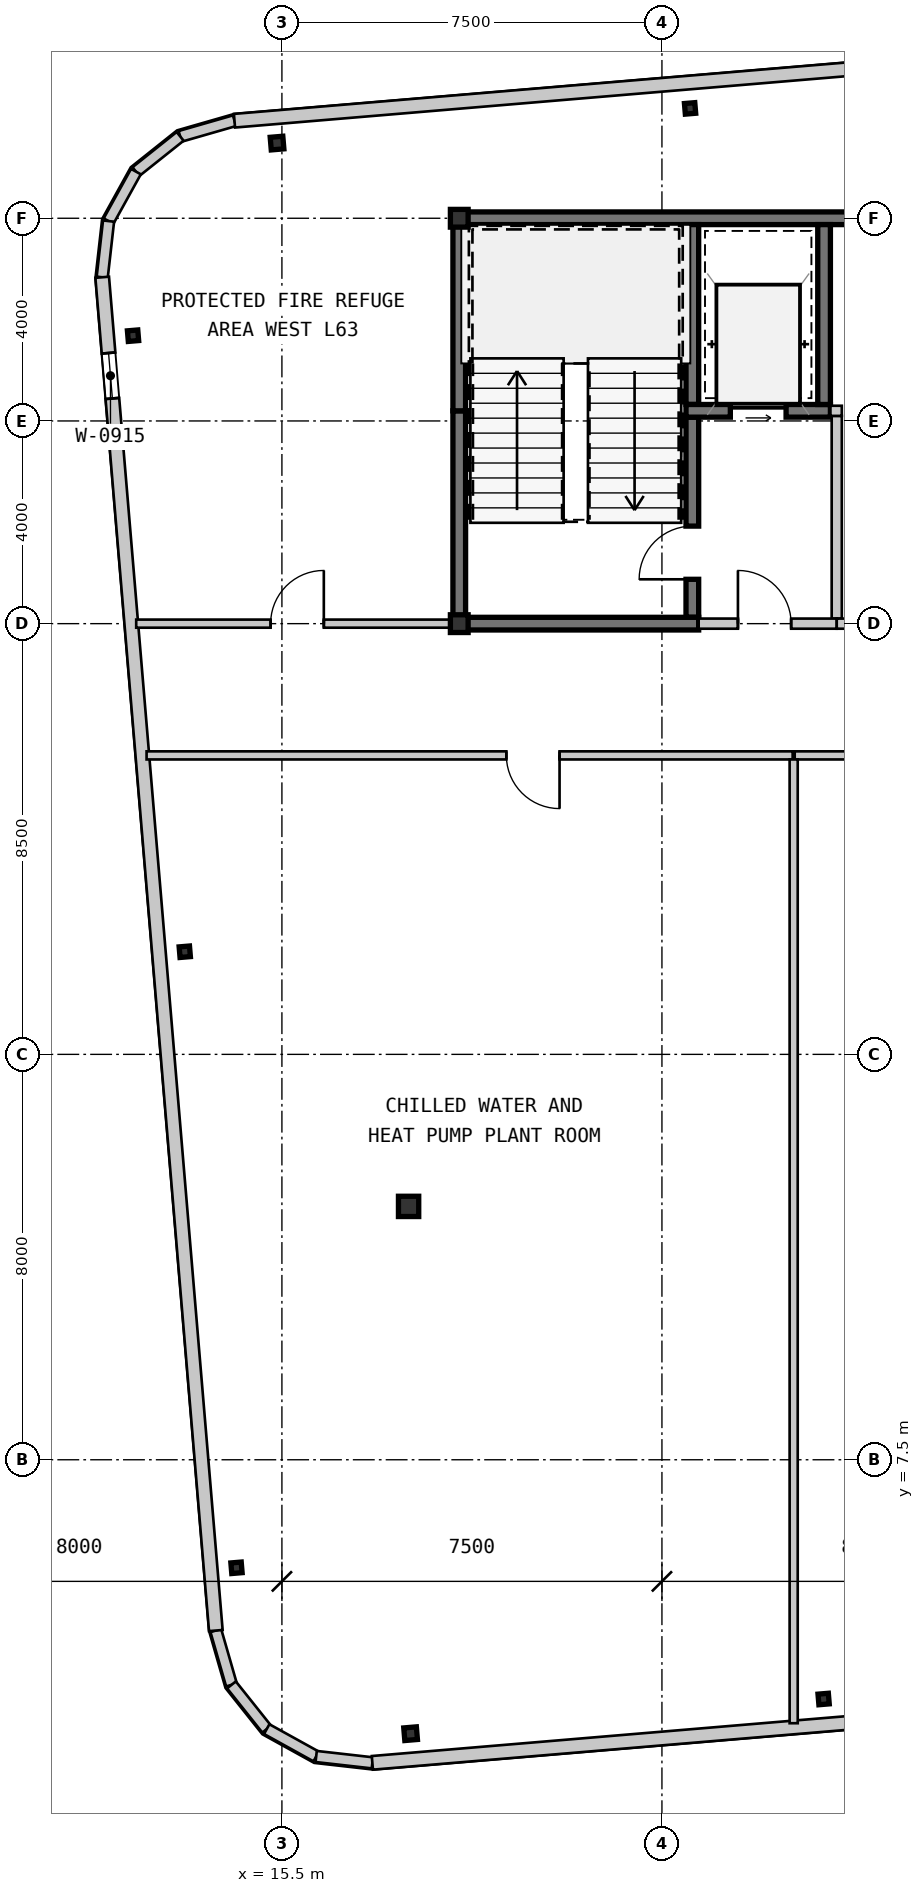
"""IFC4 building model, lengths in metres.
Left out: names, types, materials, properties, quantities, classifications, styles, units other than length and angle.
Written with IfcOpenShell. Run it as: python <this file> out.ifc"""

import sys

from ifc_helpers import new_model, si_unit, direction, frame, frame_2d, origin, origin_2d, place, context, subcontext, project, spatial, rectangle, hollow_rectangle, i_section, extrude, source, transform, mapped, element, fill, save


model = new_model("IFC4")
c1 = context("Model", 3, precision=1e-05, world=origin(), true_north=direction((0.0, 1.0)))
c2 = subcontext(c1, "Body", "Model", "MODEL_VIEW")
j1 = project(units=[si_unit("LENGTHUNIT", "METRE"), si_unit("PLANEANGLEUNIT", "RADIAN")], contexts=[c1])
p1 = place(None, origin())
s1 = spatial("IfcSite", under=j1, at=p1, CompositionType="ELEMENT")
p2 = place(p1, origin())
s2 = spatial("IfcBuilding", under=s1, at=p2, CompositionType="ELEMENT")
p3 = place(p2, frame((0.0, 0.0, 207.2)))
s3 = spatial("IfcBuildingStorey", under=s2, at=p3, CompositionType="ELEMENT", Elevation=207.2)
m1 = source(origin(), c2, "Body", "SweptSolid", [
    extrude(hollow_rectangle(XDim=0.35, YDim=0.35, WallThickness=0.016, at=origin_2d()), origin(), (0.0, 0.0, 1.0), 4.2),
])
for number, where, z_axis, x_axis in (
    (1, (19.0, 24.0, 0.0), (0.0, 0.0, 1.0), (1.0, 0.0, 0.0)),
    (2, (19.0, 32.0, 0.0), (0.0, 0.0, 1.0), (1.0, 0.0, 0.0)),
):
    element("IfcColumn", number, at=place(p3, frame(where, z_axis=z_axis, x_axis=x_axis)), inside=s3, PredefinedType="COLUMN", context=c2, shape_type="MappedRepresentation", body=[
        mapped(m1, transform((0.0, 0.0, 0.0), scale=1.0)),
    ])
m2 = source(origin(), c2, "Body", "SweptSolid", [
    extrude(hollow_rectangle(XDim=0.4, YDim=0.4, WallThickness=0.016, at=origin_2d()), origin(), (0.0, 0.0, 1.0), 4.2),
])
p4 = place(p3, frame((18.0, 12.5, 0.0), z_axis=(0.0, 0.0, 1.0), x_axis=(1.0, 0.0, 0.0)))
e3 = element("IfcColumn", 3, at=p4, inside=s3, PredefinedType="COLUMN", context=c2, shape_type="MappedRepresentation", body=[
    mapped(m2, transform((0.0, 0.0, 0.0), scale=1.0)),
])
m3 = source(origin(), c2, "Body", "SweptSolid", [
    extrude(hollow_rectangle(XDim=0.25, YDim=0.25, WallThickness=0.01, at=origin_2d()), origin(), (0.0, 0.0, 1.0), 4.2),
])
p5 = place(p3, frame((18.04, 2.094, 0.0), z_axis=(0.0, 0.0, 1.0), x_axis=(0.99649285925, 0.083677843332, 0.0)))
e4 = element("IfcColumn", 4, at=p5, inside=s3, PredefinedType="COLUMN", context=c2, shape_type="MappedRepresentation", body=[
    mapped(m3, transform((0.0, 0.0, 0.0), scale=1.0)),
])
m4 = source(origin(), c2, "Body", "SweptSolid", [
    extrude(i_section(OverallWidth=0.205, OverallDepth=0.21, WebThickness=0.009, FlangeThickness=0.014, at=origin_2d()), origin(), (0.0, 0.0, 1.0), 4.2),
])
p6 = place(p3, frame((26.191, 2.779, 0.0), z_axis=(0.0, 0.0, 1.0), x_axis=(0.99649285925, 0.083677843332, 0.0)))
e5 = element("IfcColumn", 5, at=p6, inside=s3, PredefinedType="COLUMN", context=c2, shape_type="MappedRepresentation", body=[
    mapped(m4, transform((0.0, 0.0, 0.0), scale=1.0)),
])
p7 = place(p3, frame((15.404, 33.484, 0.0), z_axis=(0.0, 0.0, 1.0), x_axis=(0.99649285925, 0.083677843332, 0.0)))
e6 = element("IfcColumn", 6, at=p7, inside=s3, PredefinedType="COLUMN", context=c2, shape_type="MappedRepresentation", body=[
    mapped(m3, transform((0.0, 0.0, 0.0), scale=1.0)),
])
for number, where, z_axis, x_axis in (
    (7, (23.555, 34.168, 0.0), (0.0, 0.0, 1.0), (0.996, 0.084, 0.0)),
    (8, (14.604, 5.368, 0.0), (0.0, 0.0, 1.0), (0.996, 0.084, 0.0)),
    (9, (13.583, 17.525, 0.0), (0.0, 0.0, 1.0), (0.996, 0.084, 0.0)),
    (10, (12.562, 29.682, 0.0), (0.0, 0.0, 1.0), (0.996, 0.084, 0.0)),
):
    element("IfcColumn", number, at=place(p3, frame(where, z_axis=z_axis, x_axis=x_axis)), inside=s3, PredefinedType="COLUMN", context=c2, shape_type="MappedRepresentation", body=[
        mapped(m4, transform((0.0, 0.0, 0.0), scale=1.0)),
    ])
m5 = source(origin(), c2, "Body", "SweptSolid", [
    extrude(rectangle(XDim=1.116, YDim=0.22, at=frame_2d((0.558, 0.0))), origin(), (0.0, 0.0, 1.0), 3.78),
])
p8 = place(p3, frame((14.564, 33.925, 0.0), z_axis=(0.0, 0.0, 1.0), x_axis=(-0.961010464297, -0.276512002475, 0.0)))
e11 = element("IfcWall", 11, at=p8, inside=s3, PredefinedType="SOLIDWALL", context=c2, shape_type="MappedRepresentation", body=[
    mapped(m5, transform((0.0, 0.0, 0.0), scale=1.0)),
])
m6 = source(origin(), c2, "Body", "SweptSolid", [
    extrude(rectangle(XDim=1.116, YDim=0.22, at=frame_2d((0.558, 0.0))), origin(), (0.0, 0.0, 1.0), 3.78),
])
p9 = place(p3, frame((13.491, 33.616, 0.0), z_axis=(0.0, 0.0, 1.0), x_axis=(-0.782062884215, -0.623199522732, 0.0)))
e12 = element("IfcWall", 12, at=p9, inside=s3, PredefinedType="SOLIDWALL", context=c2, shape_type="MappedRepresentation", body=[
    mapped(m6, transform((0.0, 0.0, 0.0), scale=1.0)),
])
for number, where, z_axis, x_axis in (
    (13, (12.619, 32.921, 0.0), (0.0, 0.0, 1.0), (-0.484, -0.875, 0.0)),
    (14, (12.079, 31.944, 0.0), (0.0, 0.0, 1.0), (-0.112, -0.994, 0.0)),
    (15, (14.196, 4.13, 0.0), (0.0, 0.0, 1.0), (0.277, -0.961, 0.0)),
    (16, (14.504, 3.057, 0.0), (0.0, 0.0, 1.0), (0.623, -0.782, 0.0)),
    (17, (15.2, 2.184, 0.0), (0.0, 0.0, 1.0), (0.875, -0.484, 0.0)),
    (18, (16.176, 1.644, 0.0), (0.0, 0.0, 1.0), (0.994, -0.112, 0.0)),
):
    element("IfcWall", number, at=place(p3, frame(where, z_axis=z_axis, x_axis=x_axis)), inside=s3, PredefinedType="SOLIDWALL", context=c2, shape_type="MappedRepresentation", body=[
        mapped(m5, transform((0.0, 0.0, 0.0), scale=1.0)),
    ])
m7 = source(origin(), c2, "Body", "SweptSolid", [
    extrude(rectangle(XDim=37.323, YDim=0.27, at=frame_2d((18.661, 0.0))), origin(), (0.0, 0.0, 1.0), 3.78),
])
p10 = place(p3, frame((17.285, 1.519, 0.0), z_axis=(0.0, 0.0, 1.0), x_axis=(0.99649291123, 0.083677224315, 0.0)))
e19 = element("IfcWall", 19, at=p10, inside=s3, PredefinedType="SOLIDWALL", context=c2, shape_type="MappedRepresentation", body=[
    mapped(m7, transform((0.0, 0.0, 0.0), scale=1.0)),
])
m8 = source(origin(), c2, "Body", "SweptSolid", [
    extrude(rectangle(XDim=42.5, YDim=0.27, at=frame_2d((21.25, 0.0))), origin(), (0.0, 0.0, 1.0), 3.78),
])
p11 = place(p3, frame((56.915, 37.481, 0.0), z_axis=(0.0, 0.0, 1.0), x_axis=(-0.996492667128, -0.083680131217, 0.0)))
e20 = element("IfcWall", 20, at=p11, inside=s3, PredefinedType="SOLIDWALL", context=c2, shape_type="MappedRepresentation", body=[
    mapped(m8, transform((0.0, 0.0, 0.0), scale=1.0)),
])
m9 = source(origin(), c2, "Body", "SweptSolid", [
    extrude(rectangle(XDim=0.9, YDim=1.5, at=frame_2d((0.45, 0.75))), frame((0.0, 0.145, 0.0), z_axis=(0.0, -1.0, 0.0), x_axis=(1.0, 0.0, 0.0)), (0.0, 0.0, 1.0), 0.29),
])
p12 = place(p11, frame((1.25, 0.0, 1.1)))
e21 = element("IfcOpeningElement", 21, at=p12, cuts=e20, PredefinedType="OPENING", context=c2, shape_type="MappedRepresentation", body=[
    mapped(m9, transform((0.0, 0.0, 0.0), scale=1.0)),
])
m10 = source(origin(), c2, "Body", "SweptSolid", [
    extrude(rectangle(XDim=26.8, YDim=0.27, at=frame_2d((13.4, 0.0))), origin(), (0.0, 0.0, 1.0), 3.78),
])
p13 = place(p3, frame((11.953, 30.835, 0.0), z_axis=(0.0, 0.0, 1.0), x_axis=(0.083673473834, -0.996493226157, 0.0)))
e22 = element("IfcWall", 22, at=p13, inside=s3, PredefinedType="SOLIDWALL", context=c2, shape_type="MappedRepresentation", body=[
    mapped(m10, transform((0.0, 0.0, 0.0), scale=1.0)),
])
p14 = place(p13, frame((1.5, 0.0, 0.7)))
e23 = element("IfcOpeningElement", 23, at=p14, cuts=e22, PredefinedType="OPENING", context=c2, shape_type="MappedRepresentation", body=[
    mapped(m9, transform((0.0, 0.0, 0.0), scale=1.0)),
])
m11 = source(origin(), c2, "Body", "SweptSolid", [
    extrude(rectangle(XDim=9.125, YDim=0.25, at=frame_2d((4.562, 0.0))), origin(), (0.0, 0.0, 1.0), 3.78),
])
p15 = place(p3, frame((18.875, 32.0, 0.0), z_axis=(0.0, 0.0, 1.0), x_axis=(1.0, 0.0, 0.0)))
e24 = element("IfcWall", 24, at=p15, inside=s3, PredefinedType="SHEAR", context=c2, shape_type="MappedRepresentation", body=[
    mapped(m11, transform((0.0, 0.0, 0.0), scale=1.0)),
])
m12 = source(origin(), c2, "Body", "SweptSolid", [
    extrude(rectangle(XDim=4.075, YDim=0.25, at=frame_2d((2.038, 0.0))), origin(), (0.0, 0.0, 1.0), 3.78),
])
p16 = place(p3, frame((19.0, 24.125, 0.0), z_axis=(0.0, 0.0, 1.0), x_axis=(0.0, 1.0, 0.0)))
e25 = element("IfcWall", 25, at=p16, inside=s3, PredefinedType="SHEAR", context=c2, shape_type="MappedRepresentation", body=[
    mapped(m12, transform((0.0, 0.0, 0.0), scale=1.0)),
])
m13 = source(origin(), c2, "Body", "SweptSolid", [
    extrude(rectangle(XDim=3.675, YDim=0.25, at=frame_2d((1.837, 0.0))), origin(), (0.0, 0.0, 1.0), 3.78),
])
p17 = place(p3, frame((19.0, 28.2, 0.0), z_axis=(0.0, 0.0, 1.0), x_axis=(0.0, 1.0, 0.0)))
e26 = element("IfcWall", 26, at=p17, inside=s3, PredefinedType="SHEAR", context=c2, shape_type="MappedRepresentation", body=[
    mapped(m13, transform((0.0, 0.0, 0.0), scale=1.0)),
])
m14 = source(origin(), c2, "Body", "SweptSolid", [
    extrude(rectangle(XDim=3.55, YDim=0.25, at=frame_2d((1.775, 0.0))), origin(), (0.0, 0.0, 1.0), 3.78),
])
p18 = place(p3, frame((23.6, 28.325, 0.0), z_axis=(0.0, 0.0, 1.0), x_axis=(0.0, 1.0, 0.0)))
e27 = element("IfcWall", 27, at=p18, inside=s3, PredefinedType="SHEAR", context=c2, shape_type="MappedRepresentation", body=[
    mapped(m14, transform((0.0, 0.0, 0.0), scale=1.0)),
])
m15 = source(origin(), c2, "Body", "SweptSolid", [
    extrude(rectangle(XDim=3.95, YDim=0.25, at=frame_2d((1.975, 0.0))), origin(), (0.0, 0.0, 1.0), 3.78),
])
p19 = place(p3, frame((23.6, 24.125, 0.0), z_axis=(0.0, 0.0, 1.0), x_axis=(0.0, 1.0, 0.0)))
e28 = element("IfcWall", 28, at=p19, inside=s3, PredefinedType="SHEAR", context=c2, shape_type="MappedRepresentation", body=[
    mapped(m15, transform((0.0, 0.0, 0.0), scale=1.0)),
])
m16 = source(origin(), c2, "Body", "SweptSolid", [
    extrude(rectangle(XDim=1.05, YDim=2.1, at=frame_2d((0.525, 1.05))), frame((0.0, 0.135, 0.0), z_axis=(0.0, -1.0, 0.0), x_axis=(1.0, 0.0, 0.0)), (0.0, 0.0, 1.0), 0.27),
])
p20 = place(p19, frame((0.75, 0.0, 0.0)))
e29 = element("IfcOpeningElement", 29, at=p20, cuts=e28, PredefinedType="OPENING", context=c2, shape_type="MappedRepresentation", body=[
    mapped(m16, transform((0.0, 0.0, 0.0), scale=1.0)),
])
m17 = source(origin(), c2, "Body", "SweptSolid", [
    extrude(rectangle(XDim=4.85, YDim=0.25, at=frame_2d((2.425, 0.0))), origin(), (0.0, 0.0, 1.0), 3.78),
])
p21 = place(p3, frame((18.875, 24.0, 0.0), z_axis=(0.0, 0.0, 1.0), x_axis=(1.0, 0.0, 0.0)))
e30 = element("IfcWall", 30, at=p21, inside=s3, PredefinedType="SHEAR", context=c2, shape_type="MappedRepresentation", body=[
    mapped(m17, transform((0.0, 0.0, 0.0), scale=1.0)),
])
m18 = source(origin(), c2, "Body", "SweptSolid", [
    extrude(rectangle(XDim=2.85, YDim=0.25, at=frame_2d((1.425, 0.0))), origin(), (0.0, 0.0, 1.0), 3.78),
])
p22 = place(p3, frame((23.475, 28.2, 0.0), z_axis=(0.0, 0.0, 1.0), x_axis=(1.0, 0.0, 0.0)))
e31 = element("IfcWall", 31, at=p22, inside=s3, PredefinedType="SHEAR", context=c2, shape_type="MappedRepresentation", body=[
    mapped(m18, transform((0.0, 0.0, 0.0), scale=1.0)),
])
m19 = source(origin(), c2, "Body", "SweptSolid", [
    extrude(rectangle(XDim=1.1, YDim=2.15, at=frame_2d((0.55, 1.075))), frame((0.0, 0.135, 0.0), z_axis=(0.0, -1.0, 0.0), x_axis=(1.0, 0.0, 0.0)), (0.0, 0.0, 1.0), 0.27),
])
p23 = place(p22, frame((0.875, 0.0, 0.0)))
e32 = element("IfcOpeningElement", 32, at=p23, cuts=e31, PredefinedType="OPENING", context=c2, shape_type="MappedRepresentation", body=[
    mapped(m19, transform((0.0, 0.0, 0.0), scale=1.0)),
])
p24 = place(p3, frame((26.2, 28.325, 0.0), z_axis=(0.0, 0.0, 1.0), x_axis=(0.0, 1.0, 0.0)))
e33 = element("IfcWall", 33, at=p24, inside=s3, PredefinedType="SHEAR", context=c2, shape_type="MappedRepresentation", body=[
    mapped(m14, transform((0.0, 0.0, 0.0), scale=1.0)),
])
m20 = source(origin(), c2, "Body", "SweptSolid", [
    extrude(rectangle(XDim=4.0, YDim=0.2, at=frame_2d((2.0, 0.0))), origin(), (0.0, 0.0, 1.0), 3.78),
])
p25 = place(p3, frame((26.45, 24.1, 0.0), z_axis=(0.0, 0.0, 1.0), x_axis=(0.0, 1.0, 0.0)))
e34 = element("IfcWall", 34, at=p25, inside=s3, PredefinedType="SOLIDWALL", context=c2, shape_type="MappedRepresentation", body=[
    mapped(m20, transform((0.0, 0.0, 0.0), scale=1.0)),
])
m21 = source(origin(), c2, "Body", "SweptSolid", [
    extrude(rectangle(XDim=2.725, YDim=0.2, at=frame_2d((1.362, 0.0))), origin(), (0.0, 0.0, 1.0), 3.32),
])
p26 = place(p3, frame((23.725, 24.0, 0.0), z_axis=(0.0, 0.0, 1.0), x_axis=(1.0, 0.0, 0.0)))
e35 = element("IfcWall", 35, at=p26, inside=s3, PredefinedType="SOLIDWALL", context=c2, shape_type="MappedRepresentation", body=[
    mapped(m21, transform((0.0, 0.0, 0.0), scale=1.0)),
])
m22 = source(origin(), c2, "Body", "SweptSolid", [
    extrude(rectangle(XDim=1.05, YDim=2.1, at=frame_2d((0.525, 1.05))), frame((0.0, 0.11, 0.0), z_axis=(0.0, -1.0, 0.0), x_axis=(1.0, 0.0, 0.0)), (0.0, 0.0, 1.0), 0.22),
])
p27 = place(p26, frame((0.775, 0.0, 0.0)))
e36 = element("IfcOpeningElement", 36, at=p27, cuts=e35, PredefinedType="OPENING", context=c2, shape_type="MappedRepresentation", body=[
    mapped(m22, transform((0.0, 0.0, 0.0), scale=1.0)),
])
m23 = source(origin(), c2, "Body", "SweptSolid", [
    extrude(rectangle(XDim=5.35, YDim=0.2, at=frame_2d((2.675, 0.0))), origin(), (0.0, 0.0, 1.0), 3.32),
])
p28 = place(p3, frame((31.8, 24.0, 0.0), z_axis=(0.0, 0.0, 1.0), x_axis=(-1.0, 0.0, 0.0)))
e37 = element("IfcWall", 37, at=p28, inside=s3, PredefinedType="SOLIDWALL", context=c2, shape_type="MappedRepresentation", body=[
    mapped(m23, transform((0.0, 0.0, 0.0), scale=1.0)),
])
p29 = place(p28, frame((1.9, 0.0, 0.0)))
e38 = element("IfcOpeningElement", 38, at=p29, cuts=e37, PredefinedType="OPENING", context=c2, shape_type="MappedRepresentation", body=[
    mapped(m22, transform((0.0, 0.0, 0.0), scale=1.0)),
])
m24 = source(origin(), c2, "Body", "SweptSolid", [
    extrude(rectangle(XDim=6.251, YDim=0.16, at=frame_2d((3.125, 0.0))), origin(), (0.0, 0.0, 1.0), 3.78),
])
p30 = place(p3, frame((12.624, 24.0, 0.0), z_axis=(0.0, 0.0, 1.0), x_axis=(1.0, 0.0, 0.0)))
e39 = element("IfcWall", 39, at=p30, inside=s3, PredefinedType="PARTITIONING", context=c2, shape_type="MappedRepresentation", body=[
    mapped(m24, transform((0.0, 0.0, 0.0), scale=1.0)),
])
m25 = source(origin(), c2, "Body", "SweptSolid", [
    extrude(rectangle(XDim=1.05, YDim=2.1, at=frame_2d((0.525, 1.05))), frame((0.0, 0.09, 0.0), z_axis=(0.0, -1.0, 0.0), x_axis=(1.0, 0.0, 0.0)), (0.0, 0.0, 1.0), 0.18),
])
p31 = place(p30, frame((2.653, 0.0, 0.0)))
e40 = element("IfcOpeningElement", 40, at=p31, cuts=e39, PredefinedType="OPENING", context=c2, shape_type="MappedRepresentation", body=[
    mapped(m25, transform((0.0, 0.0, 0.0), scale=1.0)),
])
m26 = source(origin(), c2, "Body", "SweptSolid", [
    extrude(rectangle(XDim=12.751, YDim=0.16, at=frame_2d((6.375, 0.0))), origin(), (0.0, 0.0, 1.0), 3.78),
])
p32 = place(p3, frame((25.58, 21.4, 0.0), z_axis=(0.0, 0.0, 1.0), x_axis=(-1.0, 0.0, 0.0)))
e41 = element("IfcWall", 41, at=p32, inside=s3, PredefinedType="PARTITIONING", context=c2, shape_type="MappedRepresentation", body=[
    mapped(m26, transform((0.0, 0.0, 0.0), scale=1.0)),
])
p33 = place(p32, frame((4.6, 0.0, 0.0)))
e42 = element("IfcOpeningElement", 42, at=p33, cuts=e41, PredefinedType="OPENING", context=c2, shape_type="MappedRepresentation", body=[
    mapped(m25, transform((0.0, 0.0, 0.0), scale=1.0)),
])
m27 = source(origin(), c2, "Body", "SweptSolid", [
    extrude(rectangle(XDim=11.96, YDim=0.16, at=frame_2d((5.98, 0.0))), origin(), (0.0, 0.0, 1.0), 3.78),
])
p34 = place(p3, frame((37.58, 21.4, 0.0), z_axis=(0.0, 0.0, 1.0), x_axis=(-1.0, 0.0, 0.0)))
e43 = element("IfcWall", 43, at=p34, inside=s3, PredefinedType="PARTITIONING", context=c2, shape_type="MappedRepresentation", body=[
    mapped(m27, transform((0.0, 0.0, 0.0), scale=1.0)),
])
p35 = place(p34, frame((5.455, 0.0, 0.0)))
e44 = element("IfcOpeningElement", 44, at=p35, cuts=e43, PredefinedType="OPENING", context=c2, shape_type="MappedRepresentation", body=[
    mapped(m25, transform((0.0, 0.0, 0.0), scale=1.0)),
])
m28 = source(origin(), c2, "Body", "SweptSolid", [
    extrude(rectangle(XDim=19.019, YDim=0.16, at=frame_2d((9.51, 0.0))), origin(), (0.0, 0.0, 1.0), 3.78),
])
p36 = place(p3, frame((25.6, 21.32, 0.0), z_axis=(0.0, 0.0, 1.0), x_axis=(0.0, -1.0, 0.0)))
e45 = element("IfcWall", 45, at=p36, inside=s3, PredefinedType="PARTITIONING", context=c2, shape_type="MappedRepresentation", body=[
    mapped(m28, transform((0.0, 0.0, 0.0), scale=1.0)),
])
m29 = source(origin(), c2, "Body", "SweptSolid", [
    extrude(rectangle(XDim=0.225, YDim=0.2, at=frame_2d((0.113, 0.0))), origin(), (0.0, 0.0, 1.0), 3.78),
])
p37 = place(p3, frame((26.325, 28.2, 0.0), z_axis=(0.0, 0.0, 1.0), x_axis=(1.0, 0.0, 0.0)))
e46 = element("IfcWall", 46, at=p37, inside=s3, PredefinedType="SOLIDWALL", context=c2, shape_type="MappedRepresentation", body=[
    mapped(m29, transform((0.0, 0.0, 0.0), scale=1.0)),
])
m30 = source(origin(), c2, "Body", "SweptSolid", [
    extrude(rectangle(XDim=0.9, YDim=1.5, at=frame_2d((0.45, 0.75))), frame((0.0, 0.03, 0.0), z_axis=(0.0, -1.0, 0.0), x_axis=(1.0, 0.0, 0.0)), (0.0, 0.0, 1.0), 0.06),
])
p38 = place(p14, origin())
e47 = element("IfcWindow", 47, at=p38, inside=s3, PartitioningType="SINGLE_PANEL", PredefinedType="WINDOW", context=c2, shape_type="MappedRepresentation", body=[
    mapped(m30, transform((0.0, 0.0, 0.0), scale=1.0)),
])
fill(e23, e47)
m31 = source(origin(), c2, "Body", "SweptSolid", [
    extrude(rectangle(XDim=1.05, YDim=2.1, at=frame_2d((0.525, 1.05))), frame((0.0, 0.025, 0.0), z_axis=(0.0, -1.0, 0.0), x_axis=(1.0, 0.0, 0.0)), (0.0, 0.0, 1.0), 0.05),
])
p39 = place(p20, origin())
e48 = element("IfcDoor", 48, at=p39, inside=s3, OperationType="SINGLE_SWING_LEFT", PredefinedType="DOOR", context=c2, shape_type="MappedRepresentation", body=[
    mapped(m31, transform((0.0, 0.0, 0.0), scale=1.0)),
])
fill(e29, e48)
m32 = source(origin(), c2, "Body", "SweptSolid", [
    extrude(rectangle(XDim=1.1, YDim=2.15, at=frame_2d((0.55, 1.075))), frame((0.0, 0.025, 0.0), z_axis=(0.0, -1.0, 0.0), x_axis=(1.0, 0.0, 0.0)), (0.0, 0.0, 1.0), 0.05),
])
p40 = place(p23, origin())
e49 = element("IfcDoor", 49, at=p40, inside=s3, OperationType="SLIDING_TO_LEFT", PredefinedType="DOOR", context=c2, shape_type="MappedRepresentation", body=[
    mapped(m32, transform((0.0, 0.0, 0.0), scale=1.0)),
])
fill(e32, e49)
p41 = place(p27, origin())
e50 = element("IfcDoor", 50, at=p41, inside=s3, OperationType="SINGLE_SWING_LEFT", PredefinedType="DOOR", context=c2, shape_type="MappedRepresentation", body=[
    mapped(m31, transform((0.0, 0.0, 0.0), scale=1.0)),
])
fill(e36, e50)
p42 = place(p31, origin())
e51 = element("IfcDoor", 51, at=p42, inside=s3, OperationType="SINGLE_SWING_RIGHT", PredefinedType="DOOR", context=c2, shape_type="MappedRepresentation", body=[
    mapped(m31, transform((0.0, 0.0, 0.0), scale=1.0)),
])
fill(e40, e51)
p43 = place(p33, origin())
e52 = element("IfcDoor", 52, at=p43, inside=s3, OperationType="SINGLE_SWING_LEFT", PredefinedType="DOOR", context=c2, shape_type="MappedRepresentation", body=[
    mapped(m31, transform((0.0, 0.0, 0.0), scale=1.0)),
])
fill(e42, e52)
save(model, sys.argv[1])
